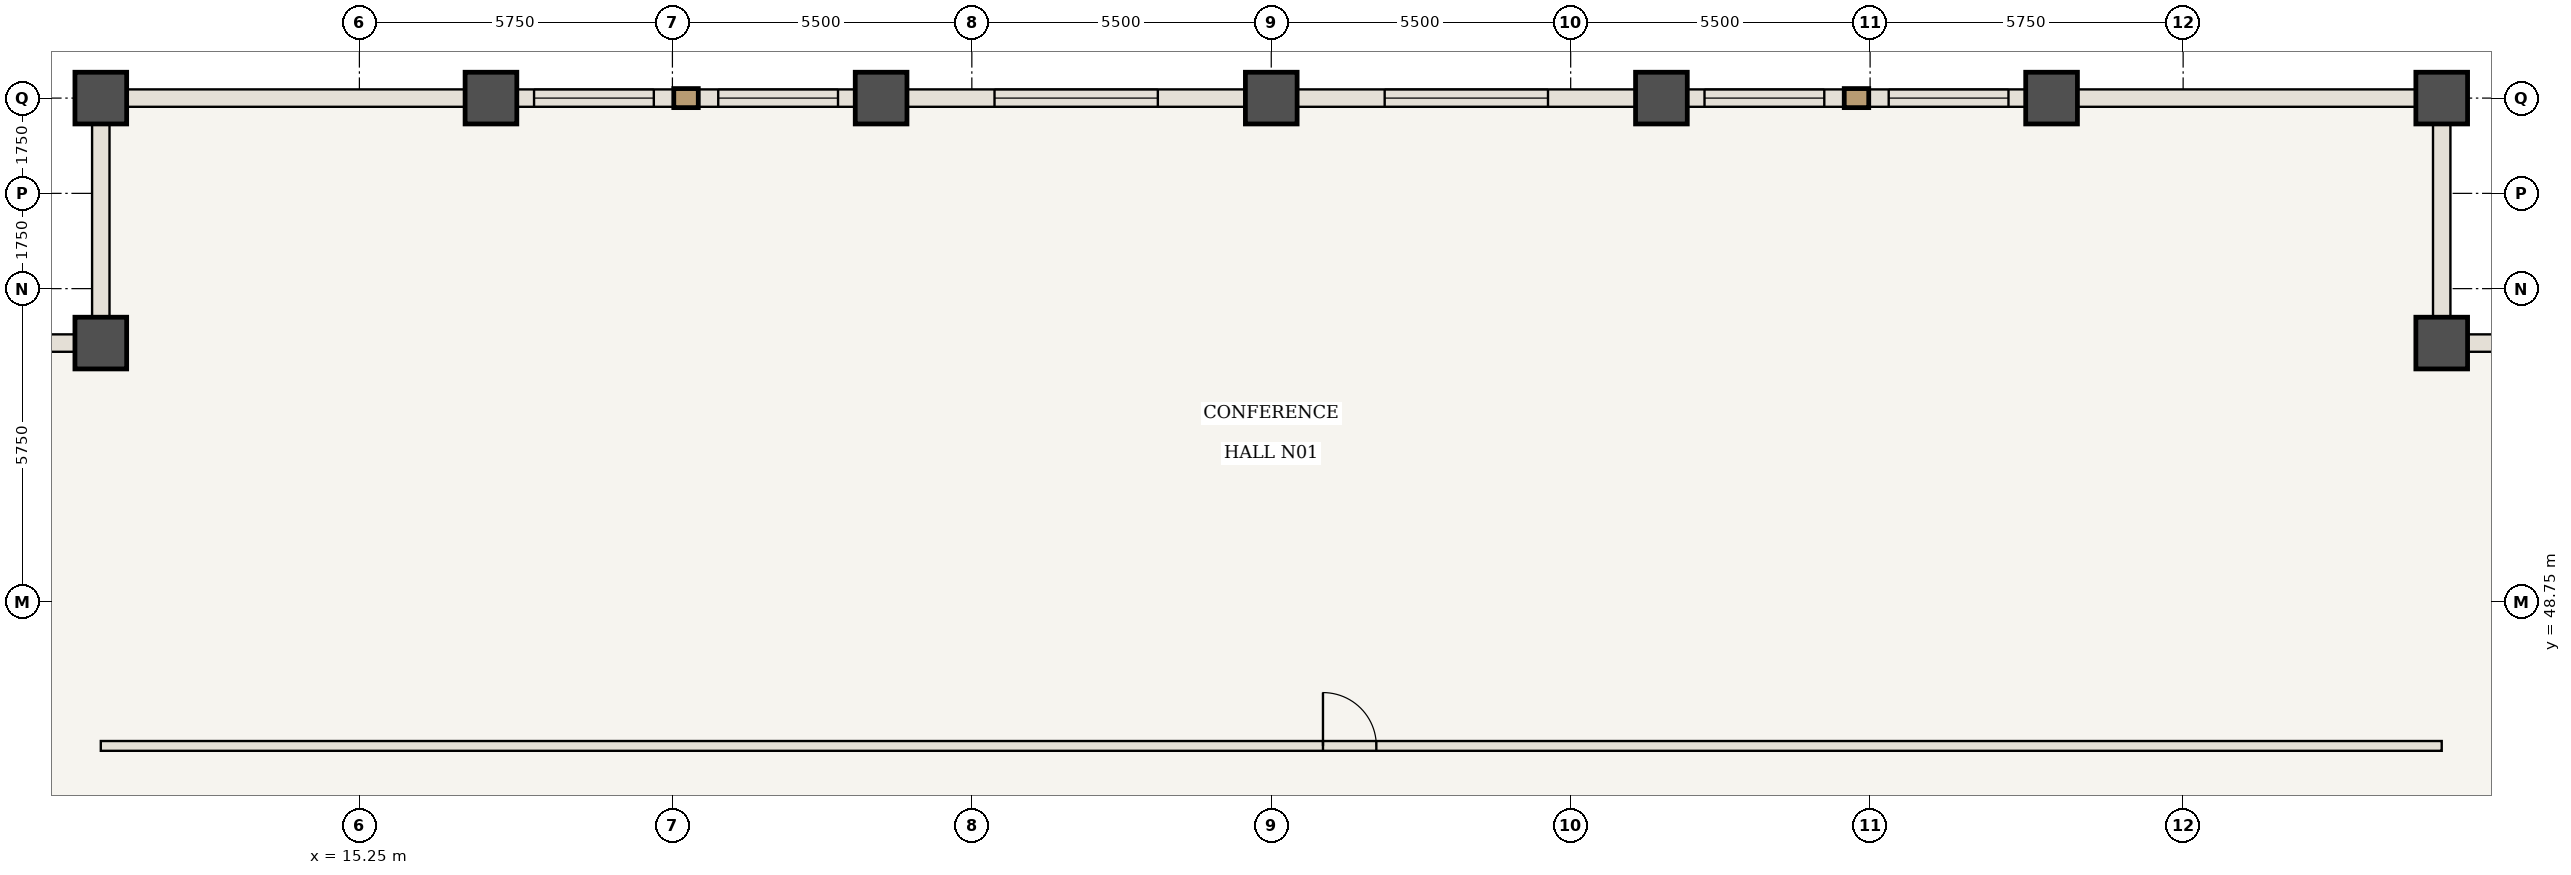
"""IFC4 building model, lengths in metres.
Left out: names, types, materials, properties, quantities, classifications, styles, units other than length and angle.
Written with IfcOpenShell. Run it as: python <this file> out.ifc"""

import sys

from ifc_helpers import new_model, si_unit, direction, frame, frame_2d, origin, origin_2d, place, context, subcontext, project, spatial, rectangle, extrude, element, fill, save


model = new_model("IFC4")
c1 = context("Model", 3, precision=1e-05, world=origin(), true_north=direction((0.0, 1.0)))
c2 = subcontext(c1, "Body", "Model", "MODEL_VIEW")
j1 = project(units=[si_unit("LENGTHUNIT", "METRE"), si_unit("PLANEANGLEUNIT", "RADIAN")], contexts=[c1])
p1 = place(None, origin())
s1 = spatial("IfcSite", under=j1, at=p1, CompositionType="ELEMENT")
p2 = place(p1, origin())
s2 = spatial("IfcBuilding", under=s1, at=p2, CompositionType="ELEMENT")
p3 = place(p2, frame((0.0, 0.0, 149.1)))
s3 = spatial("IfcBuildingStorey", under=s2, at=p3, CompositionType="ELEMENT", Elevation=149.1)
for number, where, z_axis, x_axis in (
    (1, (53.5, 53.5, 0.0), (0.0, 0.0, 1.0), (1.0, 0.0, 0.0)),
    (2, (53.5, 58.0, 0.0), (0.0, 0.0, 1.0), (1.0, 0.0, 0.0)),
    (3, (10.5, 58.0, 0.0), (0.0, 0.0, 1.0), (1.0, 0.0, 0.0)),
    (4, (10.5, 53.5, 0.0), (0.0, 0.0, 1.0), (1.0, 0.0, 0.0)),
    (5, (17.667, 58.0, 0.0), (0.0, 0.0, 1.0), (1.0, 0.0, 0.0)),
    (6, (24.833, 58.0, 0.0), (0.0, 0.0, 1.0), (1.0, 0.0, 0.0)),
    (7, (32.0, 58.0, 0.0), (0.0, 0.0, 1.0), (1.0, 0.0, 0.0)),
    (8, (39.167, 58.0, 0.0), (0.0, 0.0, 1.0), (1.0, 0.0, 0.0)),
    (9, (46.333, 58.0, 0.0), (0.0, 0.0, 1.0), (1.0, 0.0, 0.0)),
):
    element("IfcColumn", number, at=place(p3, frame(where, z_axis=z_axis, x_axis=x_axis)), inside=s3, PredefinedType="COLUMN", context=c2, shape_type="SweptSolid", body=[
        extrude(rectangle(XDim=0.95, YDim=0.95, at=origin_2d()), origin(), (0.0, 0.0, 1.0), 3.85),
    ])
p4 = place(p3, frame((10.5, 46.1, 0.0), z_axis=(0.0, 0.0, 1.0), x_axis=(1.0, 0.0, 0.0)))
e10 = element("IfcWall", 10, at=p4, inside=s3, PredefinedType="STANDARD", context=c2, shape_type="SweptSolid", body=[
    extrude(rectangle(XDim=43.0, YDim=0.18, at=frame_2d((21.5, 0.0))), origin(), (0.0, 0.0, 1.0), 3.685),
])
p5 = place(p4, frame((22.45, 0.0, 0.0)))
e11 = element("IfcOpeningElement", 11, at=p5, cuts=e10, PredefinedType="OPENING", context=c2, shape_type="SweptSolid", body=[
    extrude(rectangle(XDim=0.98, YDim=2.2, at=frame_2d((0.49, 1.1))), frame((0.0, 0.1, 0.0), z_axis=(0.0, -1.0, 0.0), x_axis=(1.0, 0.0, 0.0)), (0.0, 0.0, 1.0), 0.2),
])
p6 = place(p3, frame((10.5, 58.0, 0.0), z_axis=(0.0, 0.0, 1.0), x_axis=(1.0, 0.0, 0.0)))
e12 = element("IfcWall", 12, at=p6, inside=s3, PredefinedType="USERDEFINED", context=c2, shape_type="SweptSolid", body=[
    extrude(rectangle(XDim=7.167, YDim=0.32, at=frame_2d((3.583, 0.0))), origin(), (0.0, 0.0, 1.0), 2.885),
])
p7 = place(p3, frame((17.667, 58.0, 0.0), z_axis=(0.0, 0.0, 1.0), x_axis=(1.0, 0.0, 0.0)))
e13 = element("IfcWall", 13, at=p7, inside=s3, PredefinedType="USERDEFINED", context=c2, shape_type="SweptSolid", body=[
    extrude(rectangle(XDim=7.167, YDim=0.32, at=frame_2d((3.583, 0.0))), origin(), (0.0, 0.0, 1.0), 2.885),
])
p8 = place(p7, frame((0.792, 0.0, 0.85)))
e14 = element("IfcOpeningElement", 14, at=p8, cuts=e13, PredefinedType="OPENING", context=c2, shape_type="SweptSolid", body=[
    extrude(rectangle(XDim=2.2, YDim=1.835, at=frame_2d((1.1, 0.917))), frame((0.0, 0.17, 0.0), z_axis=(0.0, -1.0, 0.0), x_axis=(1.0, 0.0, 0.0)), (0.0, 0.0, 1.0), 0.34),
])
p9 = place(p7, frame((4.175, 0.0, 0.85)))
e15 = element("IfcOpeningElement", 15, at=p9, cuts=e13, PredefinedType="OPENING", context=c2, shape_type="SweptSolid", body=[
    extrude(rectangle(XDim=2.2, YDim=1.835, at=frame_2d((1.1, 0.917))), frame((0.0, 0.17, 0.0), z_axis=(0.0, -1.0, 0.0), x_axis=(1.0, 0.0, 0.0)), (0.0, 0.0, 1.0), 0.34),
])
p10 = place(p3, frame((24.833, 58.0, 0.0), z_axis=(0.0, 0.0, 1.0), x_axis=(1.0, 0.0, 0.0)))
e16 = element("IfcWall", 16, at=p10, inside=s3, PredefinedType="USERDEFINED", context=c2, shape_type="SweptSolid", body=[
    extrude(rectangle(XDim=7.167, YDim=0.32, at=frame_2d((3.583, 0.0))), origin(), (0.0, 0.0, 1.0), 2.885),
])
p11 = place(p10, frame((2.083, 0.0, 0.85)))
e17 = element("IfcOpeningElement", 17, at=p11, cuts=e16, PredefinedType="OPENING", context=c2, shape_type="SweptSolid", body=[
    extrude(rectangle(XDim=3.0, YDim=1.835, at=frame_2d((1.5, 0.917))), frame((0.0, 0.17, 0.0), z_axis=(0.0, -1.0, 0.0), x_axis=(1.0, 0.0, 0.0)), (0.0, 0.0, 1.0), 0.34),
])
p12 = place(p3, frame((32.0, 58.0, 0.0), z_axis=(0.0, 0.0, 1.0), x_axis=(1.0, 0.0, 0.0)))
e18 = element("IfcWall", 18, at=p12, inside=s3, PredefinedType="USERDEFINED", context=c2, shape_type="SweptSolid", body=[
    extrude(rectangle(XDim=7.167, YDim=0.32, at=frame_2d((3.583, 0.0))), origin(), (0.0, 0.0, 1.0), 2.885),
])
p13 = place(p12, frame((2.083, 0.0, 0.85)))
e19 = element("IfcOpeningElement", 19, at=p13, cuts=e18, PredefinedType="OPENING", context=c2, shape_type="SweptSolid", body=[
    extrude(rectangle(XDim=3.0, YDim=1.835, at=frame_2d((1.5, 0.917))), frame((0.0, 0.17, 0.0), z_axis=(0.0, -1.0, 0.0), x_axis=(1.0, 0.0, 0.0)), (0.0, 0.0, 1.0), 0.34),
])
p14 = place(p3, frame((39.167, 58.0, 0.0), z_axis=(0.0, 0.0, 1.0), x_axis=(1.0, 0.0, 0.0)))
e20 = element("IfcWall", 20, at=p14, inside=s3, PredefinedType="USERDEFINED", context=c2, shape_type="SweptSolid", body=[
    extrude(rectangle(XDim=7.167, YDim=0.32, at=frame_2d((3.583, 0.0))), origin(), (0.0, 0.0, 1.0), 2.885),
])
p15 = place(p14, frame((0.792, 0.0, 0.85)))
e21 = element("IfcOpeningElement", 21, at=p15, cuts=e20, PredefinedType="OPENING", context=c2, shape_type="SweptSolid", body=[
    extrude(rectangle(XDim=2.2, YDim=1.835, at=frame_2d((1.1, 0.917))), frame((0.0, 0.17, 0.0), z_axis=(0.0, -1.0, 0.0), x_axis=(1.0, 0.0, 0.0)), (0.0, 0.0, 1.0), 0.34),
])
p16 = place(p14, frame((4.175, 0.0, 0.85)))
e22 = element("IfcOpeningElement", 22, at=p16, cuts=e20, PredefinedType="OPENING", context=c2, shape_type="SweptSolid", body=[
    extrude(rectangle(XDim=2.2, YDim=1.835, at=frame_2d((1.1, 0.917))), frame((0.0, 0.17, 0.0), z_axis=(0.0, -1.0, 0.0), x_axis=(1.0, 0.0, 0.0)), (0.0, 0.0, 1.0), 0.34),
])
p17 = place(p3, frame((46.333, 58.0, 0.0), z_axis=(0.0, 0.0, 1.0), x_axis=(1.0, 0.0, 0.0)))
e23 = element("IfcWall", 23, at=p17, inside=s3, PredefinedType="USERDEFINED", context=c2, shape_type="SweptSolid", body=[
    extrude(rectangle(XDim=7.167, YDim=0.32, at=frame_2d((3.583, 0.0))), origin(), (0.0, 0.0, 1.0), 2.885),
])
for number, where, z_axis, x_axis in (
    (24, (53.5, 53.5, 0.0), (0.0, 0.0, 1.0), (1.0, 0.0, 0.0)),
    (25, (53.5, 58.0, 0.0), (0.0, 0.0, 1.0), (0.0, -1.0, 0.0)),
    (26, (10.5, 53.5, 0.0), (0.0, 0.0, 1.0), (0.0, 1.0, 0.0)),
    (27, (6.0, 53.5, 0.0), (0.0, 0.0, 1.0), (1.0, 0.0, 0.0)),
):
    element("IfcWall", number, at=place(p3, frame(where, z_axis=z_axis, x_axis=x_axis)), inside=s3, PredefinedType="USERDEFINED", context=c2, shape_type="SweptSolid", body=[
        extrude(rectangle(XDim=4.5, YDim=0.32, at=frame_2d((2.25, 0.0))), origin(), (0.0, 0.0, 1.0), 2.885),
    ])
p18 = place(p5, origin())
e28 = element("IfcDoor", 28, at=p18, inside=s3, OperationType="SINGLE_SWING_LEFT", PredefinedType="DOOR", context=c2, shape_type="SweptSolid", body=[
    extrude(rectangle(XDim=0.98, YDim=2.2, at=frame_2d((0.49, 1.1))), frame((0.0, 0.025, 0.0), z_axis=(0.0, -1.0, 0.0), x_axis=(1.0, 0.0, 0.0)), (0.0, 0.0, 1.0), 0.05),
])
fill(e11, e28)
p19 = place(p8, origin())
e29 = element("IfcWindow", 29, at=p19, inside=s3, PartitioningType="SINGLE_PANEL", PredefinedType="WINDOW", context=c2, shape_type="SweptSolid", body=[
    extrude(rectangle(XDim=2.2, YDim=1.835, at=frame_2d((1.1, 0.917))), frame((0.0, 0.03, 0.0), z_axis=(0.0, -1.0, 0.0), x_axis=(1.0, 0.0, 0.0)), (0.0, 0.0, 1.0), 0.06),
])
fill(e14, e29)
p20 = place(p9, origin())
e30 = element("IfcWindow", 30, at=p20, inside=s3, PartitioningType="SINGLE_PANEL", PredefinedType="WINDOW", context=c2, shape_type="SweptSolid", body=[
    extrude(rectangle(XDim=2.2, YDim=1.835, at=frame_2d((1.1, 0.917))), frame((0.0, 0.03, 0.0), z_axis=(0.0, -1.0, 0.0), x_axis=(1.0, 0.0, 0.0)), (0.0, 0.0, 1.0), 0.06),
])
fill(e15, e30)
p21 = place(p11, origin())
e31 = element("IfcWindow", 31, at=p21, inside=s3, PartitioningType="SINGLE_PANEL", PredefinedType="WINDOW", context=c2, shape_type="SweptSolid", body=[
    extrude(rectangle(XDim=3.0, YDim=1.835, at=frame_2d((1.5, 0.917))), frame((0.0, 0.03, 0.0), z_axis=(0.0, -1.0, 0.0), x_axis=(1.0, 0.0, 0.0)), (0.0, 0.0, 1.0), 0.06),
])
fill(e17, e31)
p22 = place(p13, origin())
e32 = element("IfcWindow", 32, at=p22, inside=s3, PartitioningType="SINGLE_PANEL", PredefinedType="WINDOW", context=c2, shape_type="SweptSolid", body=[
    extrude(rectangle(XDim=3.0, YDim=1.835, at=frame_2d((1.5, 0.917))), frame((0.0, 0.03, 0.0), z_axis=(0.0, -1.0, 0.0), x_axis=(1.0, 0.0, 0.0)), (0.0, 0.0, 1.0), 0.06),
])
fill(e19, e32)
p23 = place(p15, origin())
e33 = element("IfcWindow", 33, at=p23, inside=s3, PartitioningType="SINGLE_PANEL", PredefinedType="WINDOW", context=c2, shape_type="SweptSolid", body=[
    extrude(rectangle(XDim=2.2, YDim=1.835, at=frame_2d((1.1, 0.917))), frame((0.0, 0.03, 0.0), z_axis=(0.0, -1.0, 0.0), x_axis=(1.0, 0.0, 0.0)), (0.0, 0.0, 1.0), 0.06),
])
fill(e21, e33)
p24 = place(p16, origin())
e34 = element("IfcWindow", 34, at=p24, inside=s3, PartitioningType="SINGLE_PANEL", PredefinedType="WINDOW", context=c2, shape_type="SweptSolid", body=[
    extrude(rectangle(XDim=2.2, YDim=1.835, at=frame_2d((1.1, 0.917))), frame((0.0, 0.03, 0.0), z_axis=(0.0, -1.0, 0.0), x_axis=(1.0, 0.0, 0.0)), (0.0, 0.0, 1.0), 0.06),
])
fill(e22, e34)
save(model, sys.argv[1])
